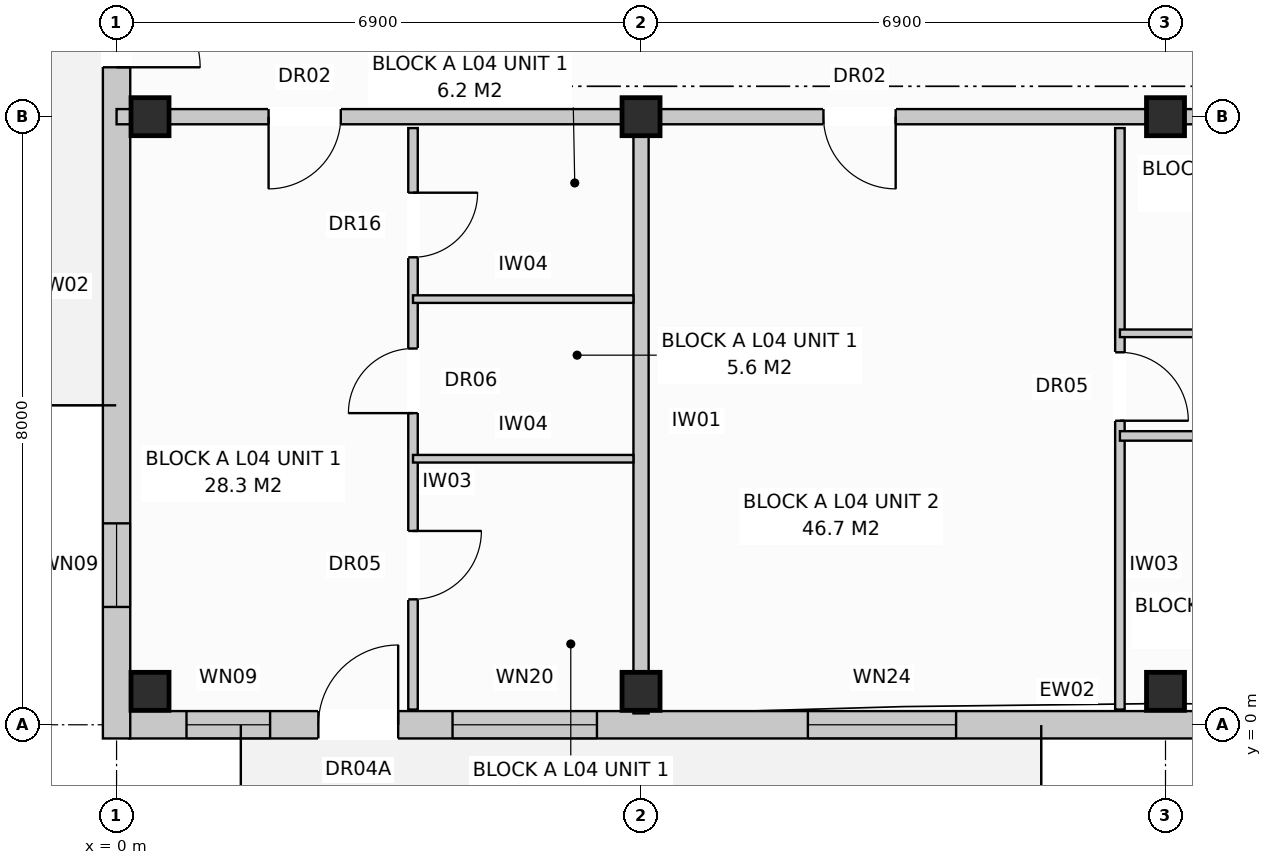
"""IFC4 building model, lengths in metres.
Left out: names, types, materials, properties, quantities, classifications, styles, units other than length and angle.
Written with IfcOpenShell. Run it as: python <this file> out.ifc"""

import sys

from ifc_helpers import new_model, si_unit, direction, frame, frame_2d, origin, origin_with_axes, origin_2d, place, context, subcontext, project, spatial, rectangle, extrude, element, fill, save


model = new_model("IFC4")
c1 = context("Model", 3, precision=1e-05, world=origin(), true_north=direction((0.0, 1.0)))
c2 = subcontext(c1, "Body", "Model", "MODEL_VIEW")
j1 = project(units=[si_unit("LENGTHUNIT", "METRE"), si_unit("PLANEANGLEUNIT", "RADIAN")], contexts=[c1])
p1 = place(None, origin())
s1 = spatial("IfcSite", under=j1, at=p1, CompositionType="ELEMENT")
p2 = place(p1, origin())
s2 = spatial("IfcBuilding", under=s1, at=p2, CompositionType="ELEMENT")
p3 = place(p2, frame((0.0, 0.0, 14.4)))
s3 = spatial("IfcBuildingStorey", under=s2, at=p3, CompositionType="ELEMENT", Elevation=14.4)
for number, where, z_axis, x_axis in (
    (1, (0.44, 0.44, 0.0), (0.0, 0.0, 1.0), (1.0, 0.0, 0.0)),
    (2, (0.44, 8.0, 0.0), (0.0, 0.0, 1.0), (1.0, 0.0, 0.0)),
    (3, (6.9, 0.44, 0.0), (0.0, 0.0, 1.0), (1.0, 0.0, 0.0)),
    (4, (6.9, 8.0, 0.0), (0.0, 0.0, 1.0), (1.0, 0.0, 0.0)),
    (5, (13.8, 0.44, 0.0), (0.0, 0.0, 1.0), (1.0, 0.0, 0.0)),
    (6, (13.8, 8.0, 0.0), (0.0, 0.0, 1.0), (1.0, 0.0, 0.0)),
):
    element("IfcColumn", number, at=place(p3, frame(where, z_axis=z_axis, x_axis=x_axis)), inside=s3, PredefinedType="COLUMN", context=c2, shape_type="SweptSolid", body=[
        extrude(rectangle(XDim=0.5, YDim=0.5, at=origin_2d()), origin(), (0.0, 0.0, 1.0), 3.2),
    ])
p4 = place(p3, frame((0.17, 0.0, 0.0), z_axis=(0.0, 0.0, 1.0), x_axis=(1.0, 0.0, 0.0)))
e7 = element("IfcWall", 7, at=p4, inside=s3, PredefinedType="STANDARD", context=c2, shape_type="SweptSolid", body=[
    extrude(rectangle(XDim=54.86, YDim=0.36, at=frame_2d((27.43, 0.0))), origin(), (0.0, 0.0, 1.0), 2.94),
])
p5 = place(p4, frame((2.485, 0.0, 0.0)))
e8 = element("IfcOpeningElement", 8, at=p5, cuts=e7, PredefinedType="OPENING", context=c2, shape_type="SweptSolid", body=[
    extrude(rectangle(XDim=1.05, YDim=2.12, at=frame_2d((0.525, 1.06))), frame((0.0, 0.192, 0.0), z_axis=(0.0, -1.0, 0.0), x_axis=(1.0, 0.0, 0.0)), (0.0, 0.0, 1.0), 0.384),
])
p6 = place(p4, frame((16.985, 0.0, 0.0)))
e9 = element("IfcOpeningElement", 9, at=p6, cuts=e7, PredefinedType="OPENING", context=c2, shape_type="SweptSolid", body=[
    extrude(rectangle(XDim=1.05, YDim=2.12, at=frame_2d((0.525, 1.06))), frame((0.0, 0.192, 0.0), z_axis=(0.0, -1.0, 0.0), x_axis=(1.0, 0.0, 0.0)), (0.0, 0.0, 1.0), 0.384),
])
p7 = place(p4, frame((30.085, 0.0, 0.0)))
e10 = element("IfcOpeningElement", 10, at=p7, cuts=e7, PredefinedType="OPENING", context=c2, shape_type="SweptSolid", body=[
    extrude(rectangle(XDim=1.05, YDim=2.12, at=frame_2d((0.525, 1.06))), frame((0.0, 0.192, 0.0), z_axis=(0.0, -1.0, 0.0), x_axis=(1.0, 0.0, 0.0)), (0.0, 0.0, 1.0), 0.384),
])
p8 = place(p4, frame((44.141, 0.0, 0.0)))
e11 = element("IfcOpeningElement", 11, at=p8, cuts=e7, PredefinedType="OPENING", context=c2, shape_type="SweptSolid", body=[
    extrude(rectangle(XDim=1.05, YDim=2.12, at=frame_2d((0.525, 1.06))), frame((0.0, 0.192, 0.0), z_axis=(0.0, -1.0, 0.0), x_axis=(1.0, 0.0, 0.0)), (0.0, 0.0, 1.0), 0.384),
])
p9 = place(p4, frame((0.75, 0.0, 0.72)))
e12 = element("IfcOpeningElement", 12, at=p9, cuts=e7, PredefinedType="OPENING", context=c2, shape_type="SweptSolid", body=[
    extrude(rectangle(XDim=1.1, YDim=1.5, at=frame_2d((0.55, 0.75))), frame((0.0, 0.192, 0.0), z_axis=(0.0, -1.0, 0.0), x_axis=(1.0, 0.0, 0.0)), (0.0, 0.0, 1.0), 0.384),
])
p10 = place(p4, frame((4.25, 0.0, 0.72)))
e13 = element("IfcOpeningElement", 13, at=p10, cuts=e7, PredefinedType="OPENING", context=c2, shape_type="SweptSolid", body=[
    extrude(rectangle(XDim=1.9, YDim=1.85, at=frame_2d((0.95, 0.925))), frame((0.0, 0.192, 0.0), z_axis=(0.0, -1.0, 0.0), x_axis=(1.0, 0.0, 0.0)), (0.0, 0.0, 1.0), 0.384),
])
p11 = place(p4, frame((8.925, 0.0, 0.8)))
e14 = element("IfcOpeningElement", 14, at=p11, cuts=e7, PredefinedType="OPENING", context=c2, shape_type="SweptSolid", body=[
    extrude(rectangle(XDim=1.95, YDim=1.65, at=frame_2d((0.975, 0.825))), frame((0.0, 0.192, 0.0), z_axis=(0.0, -1.0, 0.0), x_axis=(1.0, 0.0, 0.0)), (0.0, 0.0, 1.0), 0.384),
])
p12 = place(p4, frame((15.05, 0.0, 0.72)))
e15 = element("IfcOpeningElement", 15, at=p12, cuts=e7, PredefinedType="OPENING", context=c2, shape_type="SweptSolid", body=[
    extrude(rectangle(XDim=1.1, YDim=1.5, at=frame_2d((0.55, 0.75))), frame((0.0, 0.192, 0.0), z_axis=(0.0, -1.0, 0.0), x_axis=(1.0, 0.0, 0.0)), (0.0, 0.0, 1.0), 0.384),
])
p13 = place(p4, frame((21.05, 0.0, 0.72)))
e16 = element("IfcOpeningElement", 16, at=p13, cuts=e7, PredefinedType="OPENING", context=c2, shape_type="SweptSolid", body=[
    extrude(rectangle(XDim=1.9, YDim=1.85, at=frame_2d((0.95, 0.925))), frame((0.0, 0.192, 0.0), z_axis=(0.0, -1.0, 0.0), x_axis=(1.0, 0.0, 0.0)), (0.0, 0.0, 1.0), 0.384),
])
p14 = place(p4, frame((24.85, 0.0, 0.72)))
e17 = element("IfcOpeningElement", 17, at=p14, cuts=e7, PredefinedType="OPENING", context=c2, shape_type="SweptSolid", body=[
    extrude(rectangle(XDim=1.1, YDim=1.5, at=frame_2d((0.55, 0.75))), frame((0.0, 0.192, 0.0), z_axis=(0.0, -1.0, 0.0), x_axis=(1.0, 0.0, 0.0)), (0.0, 0.0, 1.0), 0.384),
])
p15 = place(p4, frame((28.35, 0.0, 0.72)))
e18 = element("IfcOpeningElement", 18, at=p15, cuts=e7, PredefinedType="OPENING", context=c2, shape_type="SweptSolid", body=[
    extrude(rectangle(XDim=1.1, YDim=1.5, at=frame_2d((0.55, 0.75))), frame((0.0, 0.192, 0.0), z_axis=(0.0, -1.0, 0.0), x_axis=(1.0, 0.0, 0.0)), (0.0, 0.0, 1.0), 0.384),
])
p16 = place(p4, frame((31.85, 0.0, 0.72)))
e19 = element("IfcOpeningElement", 19, at=p16, cuts=e7, PredefinedType="OPENING", context=c2, shape_type="SweptSolid", body=[
    extrude(rectangle(XDim=1.9, YDim=1.85, at=frame_2d((0.95, 0.925))), frame((0.0, 0.192, 0.0), z_axis=(0.0, -1.0, 0.0), x_axis=(1.0, 0.0, 0.0)), (0.0, 0.0, 1.0), 0.384),
])
p17 = place(p4, frame((35.525, 0.0, 0.8)))
e20 = element("IfcOpeningElement", 20, at=p17, cuts=e7, PredefinedType="OPENING", context=c2, shape_type="SweptSolid", body=[
    extrude(rectangle(XDim=1.95, YDim=1.65, at=frame_2d((0.975, 0.825))), frame((0.0, 0.192, 0.0), z_axis=(0.0, -1.0, 0.0), x_axis=(1.0, 0.0, 0.0)), (0.0, 0.0, 1.0), 0.384),
])
p18 = place(p4, frame((39.25, 0.0, 0.72)))
e21 = element("IfcOpeningElement", 21, at=p18, cuts=e7, PredefinedType="OPENING", context=c2, shape_type="SweptSolid", body=[
    extrude(rectangle(XDim=1.1, YDim=1.5, at=frame_2d((0.55, 0.75))), frame((0.0, 0.192, 0.0), z_axis=(0.0, -1.0, 0.0), x_axis=(1.0, 0.0, 0.0)), (0.0, 0.0, 1.0), 0.384),
])
p19 = place(p4, frame((42.35, 0.0, 0.72)))
e22 = element("IfcOpeningElement", 22, at=p19, cuts=e7, PredefinedType="OPENING", context=c2, shape_type="SweptSolid", body=[
    extrude(rectangle(XDim=1.1, YDim=1.5, at=frame_2d((0.55, 0.75))), frame((0.0, 0.192, 0.0), z_axis=(0.0, -1.0, 0.0), x_axis=(1.0, 0.0, 0.0)), (0.0, 0.0, 1.0), 0.384),
])
p20 = place(p4, frame((45.725, 0.0, 0.8)))
e23 = element("IfcOpeningElement", 23, at=p20, cuts=e7, PredefinedType="OPENING", context=c2, shape_type="SweptSolid", body=[
    extrude(rectangle(XDim=1.95, YDim=1.65, at=frame_2d((0.975, 0.825))), frame((0.0, 0.192, 0.0), z_axis=(0.0, -1.0, 0.0), x_axis=(1.0, 0.0, 0.0)), (0.0, 0.0, 1.0), 0.384),
])
p21 = place(p4, frame((51.85, 0.0, 0.72)))
e24 = element("IfcOpeningElement", 24, at=p21, cuts=e7, PredefinedType="OPENING", context=c2, shape_type="SweptSolid", body=[
    extrude(rectangle(XDim=1.1, YDim=1.5, at=frame_2d((0.55, 0.75))), frame((0.0, 0.192, 0.0), z_axis=(0.0, -1.0, 0.0), x_axis=(1.0, 0.0, 0.0)), (0.0, 0.0, 1.0), 0.384),
])
p22 = place(p3, frame((0.0, -0.18, 0.0), z_axis=(0.0, 0.0, 1.0), x_axis=(0.0, 1.0, 0.0)))
e25 = element("IfcWall", 25, at=p22, inside=s3, PredefinedType="STANDARD", context=c2, shape_type="SweptSolid", body=[
    extrude(rectangle(XDim=18.76, YDim=0.36, at=frame_2d((9.38, 0.0))), origin(), (0.0, 0.0, 1.0), 2.94),
])
p23 = place(p22, frame((8.83, 0.0, 0.0)))
e26 = element("IfcOpeningElement", 26, at=p23, cuts=e25, PredefinedType="OPENING", context=c2, shape_type="SweptSolid", body=[
    extrude(rectangle(XDim=1.1, YDim=2.1, at=frame_2d((0.55, 1.05))), frame((0.0, 0.192, 0.0), z_axis=(0.0, -1.0, 0.0), x_axis=(1.0, 0.0, 0.0)), (0.0, 0.0, 1.0), 0.384),
])
p24 = place(p22, frame((1.73, 0.0, 0.72)))
e27 = element("IfcOpeningElement", 27, at=p24, cuts=e25, PredefinedType="OPENING", context=c2, shape_type="SweptSolid", body=[
    extrude(rectangle(XDim=1.1, YDim=1.5, at=frame_2d((0.55, 0.75))), frame((0.0, 0.192, 0.0), z_axis=(0.0, -1.0, 0.0), x_axis=(1.0, 0.0, 0.0)), (0.0, 0.0, 1.0), 0.384),
])
p25 = place(p22, frame((15.93, 0.0, 0.72)))
e28 = element("IfcOpeningElement", 28, at=p25, cuts=e25, PredefinedType="OPENING", context=c2, shape_type="SweptSolid", body=[
    extrude(rectangle(XDim=1.1, YDim=1.5, at=frame_2d((0.55, 0.75))), frame((0.0, 0.192, 0.0), z_axis=(0.0, -1.0, 0.0), x_axis=(1.0, 0.0, 0.0)), (0.0, 0.0, 1.0), 0.384),
])
p26 = place(p3, frame((6.9, 7.85, 0.0), z_axis=(0.0, 0.0, 1.0), x_axis=(0.0, -1.0, 0.0)))
e29 = element("IfcWall", 29, at=p26, inside=s3, PredefinedType="PARTITIONING", context=c2, shape_type="SweptSolid", body=[
    extrude(rectangle(XDim=7.7, YDim=0.2, at=frame_2d((3.85, 0.0))), origin(), (0.0, 0.0, 1.0), 2.38),
])
p27 = place(p3, frame((0.0, 8.0, 0.0), z_axis=(0.0, 0.0, 1.0), x_axis=(1.0, 0.0, 0.0)))
e30 = element("IfcWall", 30, at=p27, inside=s3, PredefinedType="PARTITIONING", context=c2, shape_type="SweptSolid", body=[
    extrude(rectangle(XDim=6.9, YDim=0.2, at=frame_2d((3.45, 0.0))), origin(), (0.0, 0.0, 1.0), 2.38),
])
p28 = place(p27, frame((2.0, 0.0, 0.0)))
e31 = element("IfcOpeningElement", 31, at=p28, cuts=e30, PredefinedType="OPENING", context=c2, shape_type="SweptSolid", body=[
    extrude(rectangle(XDim=0.95, YDim=2.15, at=frame_2d((0.475, 1.075))), frame((0.0, 0.112, 0.0), z_axis=(0.0, -1.0, 0.0), x_axis=(1.0, 0.0, 0.0)), (0.0, 0.0, 1.0), 0.224),
])
p29 = place(p3, frame((3.9, 7.85, 0.0), z_axis=(0.0, 0.0, 1.0), x_axis=(0.0, -1.0, 0.0)))
e32 = element("IfcWall", 32, at=p29, inside=s3, PredefinedType="PARTITIONING", context=c2, shape_type="SweptSolid", body=[
    extrude(rectangle(XDim=7.65, YDim=0.125, at=frame_2d((3.825, 0.0))), origin(), (0.0, 0.0, 1.0), 2.94),
])
p30 = place(p29, frame((0.85, 0.0, 0.0)))
e33 = element("IfcOpeningElement", 33, at=p30, cuts=e32, PredefinedType="OPENING", context=c2, shape_type="SweptSolid", body=[
    extrude(rectangle(XDim=0.85, YDim=2.1, at=frame_2d((0.425, 1.05))), frame((0.0, 0.074, 0.0), z_axis=(0.0, -1.0, 0.0), x_axis=(1.0, 0.0, 0.0)), (0.0, 0.0, 1.0), 0.149),
])
p31 = place(p29, frame((2.9, 0.0, 0.0)))
e34 = element("IfcOpeningElement", 34, at=p31, cuts=e32, PredefinedType="OPENING", context=c2, shape_type="SweptSolid", body=[
    extrude(rectangle(XDim=0.85, YDim=2.05, at=frame_2d((0.425, 1.025))), frame((0.0, 0.074, 0.0), z_axis=(0.0, -1.0, 0.0), x_axis=(1.0, 0.0, 0.0)), (0.0, 0.0, 1.0), 0.149),
])
p32 = place(p29, frame((5.3, 0.0, 0.0)))
e35 = element("IfcOpeningElement", 35, at=p32, cuts=e32, PredefinedType="OPENING", context=c2, shape_type="SweptSolid", body=[
    extrude(rectangle(XDim=0.9, YDim=2.1, at=frame_2d((0.45, 1.05))), frame((0.0, 0.074, 0.0), z_axis=(0.0, -1.0, 0.0), x_axis=(1.0, 0.0, 0.0)), (0.0, 0.0, 1.0), 0.149),
])
for number, where, z_axis, x_axis in (
    (36, (3.9, 5.6, 0.0), (0.0, 0.0, 1.0), (1.0, 0.0, 0.0)),
    (37, (3.9, 3.5, 0.0), (0.0, 0.0, 1.0), (1.0, 0.0, 0.0)),
):
    element("IfcWall", number, at=place(p3, frame(where, z_axis=z_axis, x_axis=x_axis)), inside=s3, PredefinedType="PARTITIONING", context=c2, shape_type="SweptSolid", body=[
        extrude(rectangle(XDim=2.9, YDim=0.1, at=frame_2d((1.45, 0.0))), origin(), (0.0, 0.0, 1.0), 2.94),
    ])
p33 = place(p3, frame((6.9, 8.0, 0.0), z_axis=(0.0, 0.0, 1.0), x_axis=(1.0, 0.0, 0.0)))
e38 = element("IfcWall", 38, at=p33, inside=s3, PredefinedType="PARTITIONING", context=c2, shape_type="SweptSolid", body=[
    extrude(rectangle(XDim=20.7, YDim=0.2, at=frame_2d((10.35, 0.0))), origin(), (0.0, 0.0, 1.0), 2.38),
])
p34 = place(p33, frame((2.4, 0.0, 0.0)))
e39 = element("IfcOpeningElement", 39, at=p34, cuts=e38, PredefinedType="OPENING", context=c2, shape_type="SweptSolid", body=[
    extrude(rectangle(XDim=0.95, YDim=2.15, at=frame_2d((0.475, 1.075))), frame((0.0, 0.112, 0.0), z_axis=(0.0, -1.0, 0.0), x_axis=(1.0, 0.0, 0.0)), (0.0, 0.0, 1.0), 0.224),
])
p35 = place(p3, frame((13.2, 7.85, 0.0), z_axis=(0.0, 0.0, 1.0), x_axis=(0.0, -1.0, 0.0)))
e40 = element("IfcWall", 40, at=p35, inside=s3, PredefinedType="PARTITIONING", context=c2, shape_type="SweptSolid", body=[
    extrude(rectangle(XDim=7.65, YDim=0.125, at=frame_2d((3.825, 0.0))), origin(), (0.0, 0.0, 1.0), 2.94),
])
p36 = place(p35, frame((2.95, 0.0, 0.0)))
e41 = element("IfcOpeningElement", 41, at=p36, cuts=e40, PredefinedType="OPENING", context=c2, shape_type="SweptSolid", body=[
    extrude(rectangle(XDim=0.9, YDim=2.1, at=frame_2d((0.45, 1.05))), frame((0.0, 0.074, 0.0), z_axis=(0.0, -1.0, 0.0), x_axis=(1.0, 0.0, 0.0)), (0.0, 0.0, 1.0), 0.149),
])
p37 = place(p3, frame((13.2, 5.15, 0.0), z_axis=(0.0, 0.0, 1.0), x_axis=(1.0, 0.0, 0.0)))
e42 = element("IfcWall", 42, at=p37, inside=s3, PredefinedType="PARTITIONING", context=c2, shape_type="SweptSolid", body=[
    extrude(rectangle(XDim=14.3, YDim=0.1, at=frame_2d((7.15, 0.0))), origin(), (0.0, 0.0, 1.0), 2.94),
])
p38 = place(p37, frame((1.6, 0.0, 0.0)))
e43 = element("IfcOpeningElement", 43, at=p38, cuts=e42, PredefinedType="OPENING", context=c2, shape_type="SweptSolid", body=[
    extrude(rectangle(XDim=0.9, YDim=2.1, at=frame_2d((0.45, 1.05))), frame((0.0, 0.062, 0.0), z_axis=(0.0, -1.0, 0.0), x_axis=(1.0, 0.0, 0.0)), (0.0, 0.0, 1.0), 0.124),
])
p39 = place(p37, frame((5.1, 0.0, 0.0)))
e44 = element("IfcOpeningElement", 44, at=p39, cuts=e42, PredefinedType="OPENING", context=c2, shape_type="SweptSolid", body=[
    extrude(rectangle(XDim=0.85, YDim=2.05, at=frame_2d((0.425, 1.025))), frame((0.0, 0.062, 0.0), z_axis=(0.0, -1.0, 0.0), x_axis=(1.0, 0.0, 0.0)), (0.0, 0.0, 1.0), 0.124),
])
p40 = place(p37, frame((8.2, 0.0, 0.0)))
e45 = element("IfcOpeningElement", 45, at=p40, cuts=e42, PredefinedType="OPENING", context=c2, shape_type="SweptSolid", body=[
    extrude(rectangle(XDim=0.85, YDim=2.05, at=frame_2d((0.425, 1.025))), frame((0.0, 0.062, 0.0), z_axis=(0.0, -1.0, 0.0), x_axis=(1.0, 0.0, 0.0)), (0.0, 0.0, 1.0), 0.124),
])
p41 = place(p37, frame((11.6, 0.0, 0.0)))
e46 = element("IfcOpeningElement", 46, at=p41, cuts=e42, PredefinedType="OPENING", context=c2, shape_type="SweptSolid", body=[
    extrude(rectangle(XDim=0.85, YDim=2.05, at=frame_2d((0.425, 1.025))), frame((0.0, 0.062, 0.0), z_axis=(0.0, -1.0, 0.0), x_axis=(1.0, 0.0, 0.0)), (0.0, 0.0, 1.0), 0.124),
])
p42 = place(p3, frame((13.2, 3.8, 0.0), z_axis=(0.0, 0.0, 1.0), x_axis=(1.0, 0.0, 0.0)))
e47 = element("IfcWall", 47, at=p42, inside=s3, PredefinedType="PARTITIONING", context=c2, shape_type="SweptSolid", body=[
    extrude(rectangle(XDim=10.4, YDim=0.125, at=frame_2d((5.2, 0.0))), origin(), (0.0, 0.0, 1.0), 2.94),
])
p43 = place(p42, frame((2.0, 0.0, 0.0)))
e48 = element("IfcOpeningElement", 48, at=p43, cuts=e47, PredefinedType="OPENING", context=c2, shape_type="SweptSolid", body=[
    extrude(rectangle(XDim=0.9, YDim=2.1, at=frame_2d((0.45, 1.05))), frame((0.0, 0.074, 0.0), z_axis=(0.0, -1.0, 0.0), x_axis=(1.0, 0.0, 0.0)), (0.0, 0.0, 1.0), 0.149),
])
p44 = place(p42, frame((7.2, 0.0, 0.0)))
e49 = element("IfcOpeningElement", 49, at=p44, cuts=e47, PredefinedType="OPENING", context=c2, shape_type="SweptSolid", body=[
    extrude(rectangle(XDim=0.9, YDim=2.1, at=frame_2d((0.45, 1.05))), frame((0.0, 0.074, 0.0), z_axis=(0.0, -1.0, 0.0), x_axis=(1.0, 0.0, 0.0)), (0.0, 0.0, 1.0), 0.149),
])
p45 = place(p5, origin_with_axes())
e50 = element("IfcDoor", 50, at=p45, inside=s3, OperationType="SINGLE_SWING_RIGHT", PredefinedType="DOOR", context=c2, shape_type="SweptSolid", body=[
    extrude(rectangle(XDim=1.05, YDim=2.12, at=frame_2d((0.525, 1.06))), frame((0.0, 0.025, 0.0), z_axis=(0.0, -1.0, 0.0), x_axis=(1.0, 0.0, 0.0)), (0.0, 0.0, 1.0), 0.05),
])
fill(e8, e50)
p46 = place(p9, origin_with_axes())
e51 = element("IfcWindow", 51, at=p46, inside=s3, PartitioningType="SINGLE_PANEL", PredefinedType="WINDOW", context=c2, shape_type="SweptSolid", body=[
    extrude(rectangle(XDim=1.1, YDim=1.5, at=frame_2d((0.55, 0.75))), frame((0.0, 0.03, 0.0), z_axis=(0.0, -1.0, 0.0), x_axis=(1.0, 0.0, 0.0)), (0.0, 0.0, 1.0), 0.06),
])
fill(e12, e51)
p47 = place(p10, origin_with_axes())
e52 = element("IfcWindow", 52, at=p47, inside=s3, PartitioningType="SINGLE_PANEL", PredefinedType="WINDOW", context=c2, shape_type="SweptSolid", body=[
    extrude(rectangle(XDim=1.9, YDim=1.85, at=frame_2d((0.95, 0.925))), frame((0.0, 0.03, 0.0), z_axis=(0.0, -1.0, 0.0), x_axis=(1.0, 0.0, 0.0)), (0.0, 0.0, 1.0), 0.06),
])
fill(e13, e52)
p48 = place(p11, origin_with_axes())
e53 = element("IfcWindow", 53, at=p48, inside=s3, PartitioningType="SINGLE_PANEL", PredefinedType="WINDOW", context=c2, shape_type="SweptSolid", body=[
    extrude(rectangle(XDim=1.95, YDim=1.65, at=frame_2d((0.975, 0.825))), frame((0.0, 0.03, 0.0), z_axis=(0.0, -1.0, 0.0), x_axis=(1.0, 0.0, 0.0)), (0.0, 0.0, 1.0), 0.06),
])
fill(e14, e53)
p49 = place(p23, frame((1.1, 0.0, 0.0), z_axis=(0.0, 0.0, 1.0), x_axis=(-1.0, 0.0, 0.0)))
e54 = element("IfcDoor", 54, at=p49, inside=s3, OperationType="SINGLE_SWING_LEFT", PredefinedType="DOOR", context=c2, shape_type="SweptSolid", body=[
    extrude(rectangle(XDim=1.1, YDim=2.1, at=frame_2d((0.55, 1.05))), frame((0.0, 0.025, 0.0), z_axis=(0.0, -1.0, 0.0), x_axis=(1.0, 0.0, 0.0)), (0.0, 0.0, 1.0), 0.05),
])
fill(e26, e54)
p50 = place(p24, origin_with_axes())
e55 = element("IfcWindow", 55, at=p50, inside=s3, PartitioningType="SINGLE_PANEL", PredefinedType="WINDOW", context=c2, shape_type="SweptSolid", body=[
    extrude(rectangle(XDim=1.1, YDim=1.5, at=frame_2d((0.55, 0.75))), frame((0.0, 0.03, 0.0), z_axis=(0.0, -1.0, 0.0), x_axis=(1.0, 0.0, 0.0)), (0.0, 0.0, 1.0), 0.06),
])
fill(e27, e55)
p51 = place(p28, frame((0.95, 0.0, 0.0), z_axis=(0.0, 0.0, 1.0), x_axis=(-1.0, 0.0, 0.0)))
e56 = element("IfcDoor", 56, at=p51, inside=s3, OperationType="SINGLE_SWING_LEFT", PredefinedType="DOOR", context=c2, shape_type="SweptSolid", body=[
    extrude(rectangle(XDim=0.95, YDim=2.15, at=frame_2d((0.475, 1.075))), frame((0.0, 0.025, 0.0), z_axis=(0.0, -1.0, 0.0), x_axis=(1.0, 0.0, 0.0)), (0.0, 0.0, 1.0), 0.05),
])
fill(e31, e56)
p52 = place(p30, origin_with_axes())
e57 = element("IfcDoor", 57, at=p52, inside=s3, OperationType="SINGLE_SWING_LEFT", PredefinedType="DOOR", context=c2, shape_type="SweptSolid", body=[
    extrude(rectangle(XDim=0.85, YDim=2.1, at=frame_2d((0.425, 1.05))), frame((0.0, 0.025, 0.0), z_axis=(0.0, -1.0, 0.0), x_axis=(1.0, 0.0, 0.0)), (0.0, 0.0, 1.0), 0.05),
])
fill(e33, e57)
p53 = place(p31, frame((0.85, 0.0, 0.0), z_axis=(0.0, 0.0, 1.0), x_axis=(-1.0, 0.0, 0.0)))
e58 = element("IfcDoor", 58, at=p53, inside=s3, OperationType="SINGLE_SWING_RIGHT", PredefinedType="DOOR", context=c2, shape_type="SweptSolid", body=[
    extrude(rectangle(XDim=0.85, YDim=2.05, at=frame_2d((0.425, 1.025))), frame((0.0, 0.025, 0.0), z_axis=(0.0, -1.0, 0.0), x_axis=(1.0, 0.0, 0.0)), (0.0, 0.0, 1.0), 0.05),
])
fill(e34, e58)
p54 = place(p32, origin_with_axes())
e59 = element("IfcDoor", 59, at=p54, inside=s3, OperationType="SINGLE_SWING_LEFT", PredefinedType="DOOR", context=c2, shape_type="SweptSolid", body=[
    extrude(rectangle(XDim=0.9, YDim=2.1, at=frame_2d((0.45, 1.05))), frame((0.0, 0.025, 0.0), z_axis=(0.0, -1.0, 0.0), x_axis=(1.0, 0.0, 0.0)), (0.0, 0.0, 1.0), 0.05),
])
fill(e35, e59)
p55 = place(p34, frame((0.95, 0.0, 0.0), z_axis=(0.0, 0.0, 1.0), x_axis=(-1.0, 0.0, 0.0)))
e60 = element("IfcDoor", 60, at=p55, inside=s3, OperationType="SINGLE_SWING_RIGHT", PredefinedType="DOOR", context=c2, shape_type="SweptSolid", body=[
    extrude(rectangle(XDim=0.95, YDim=2.15, at=frame_2d((0.475, 1.075))), frame((0.0, 0.025, 0.0), z_axis=(0.0, -1.0, 0.0), x_axis=(1.0, 0.0, 0.0)), (0.0, 0.0, 1.0), 0.05),
])
fill(e39, e60)
p56 = place(p36, origin_with_axes())
e61 = element("IfcDoor", 61, at=p56, inside=s3, OperationType="SINGLE_SWING_RIGHT", PredefinedType="DOOR", context=c2, shape_type="SweptSolid", body=[
    extrude(rectangle(XDim=0.9, YDim=2.1, at=frame_2d((0.45, 1.05))), frame((0.0, 0.025, 0.0), z_axis=(0.0, -1.0, 0.0), x_axis=(1.0, 0.0, 0.0)), (0.0, 0.0, 1.0), 0.05),
])
fill(e41, e61)
save(model, sys.argv[1])
